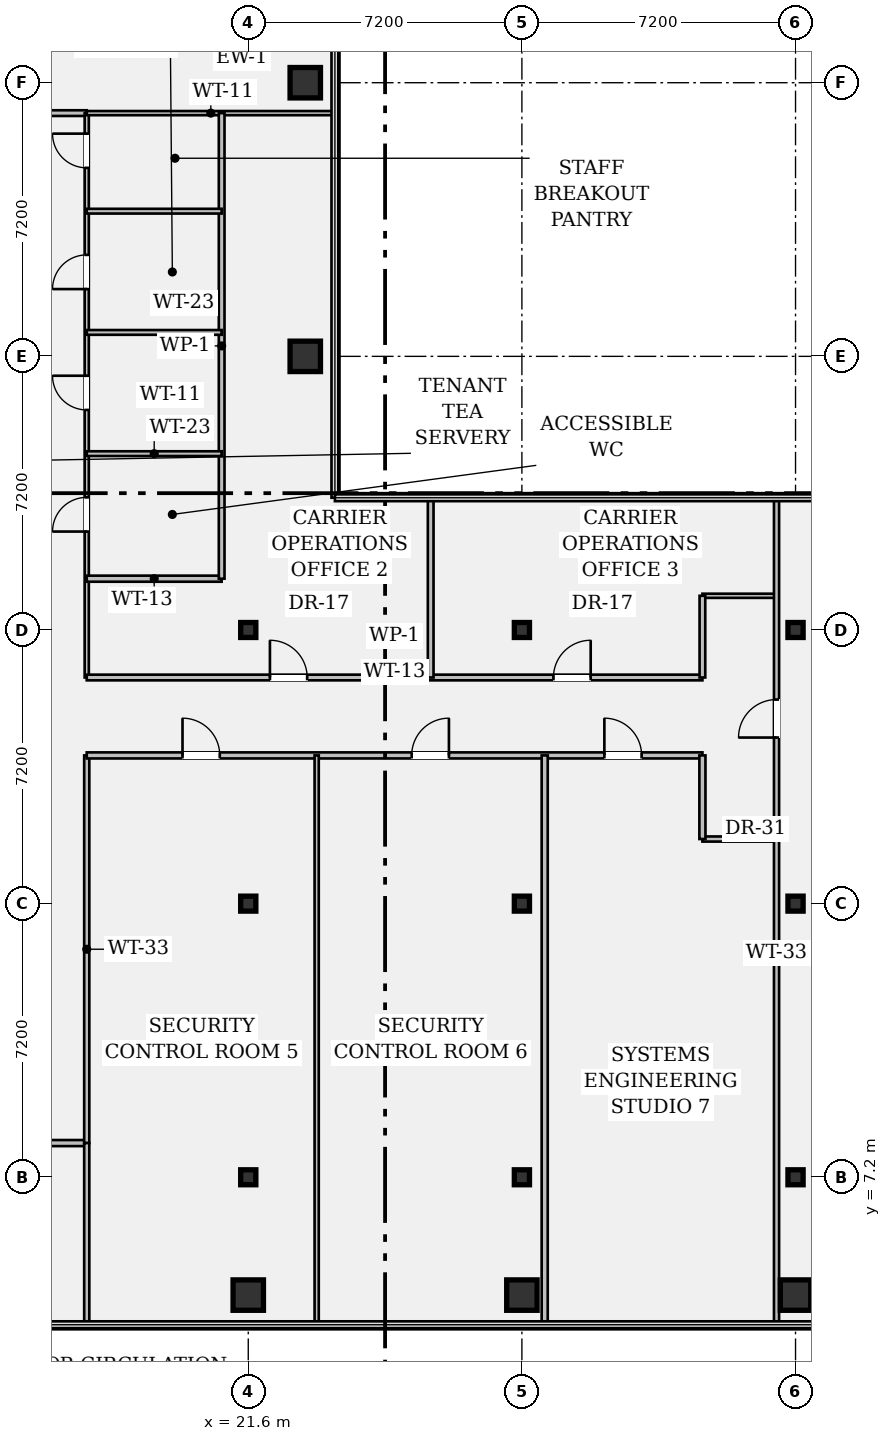
"""IFC4 building model, lengths in metres.
Left out: names, types, materials, properties, quantities, classifications, styles, units other than length and angle.
Written with IfcOpenShell. Run it as: python <this file> out.ifc"""

import sys

from ifc_helpers import new_model, si_unit, direction, frame, frame_2d, origin, origin_2d, place, context, subcontext, project, spatial, rectangle, hollow_rectangle, i_section, extrude, element, fill, save


model = new_model("IFC4")
c1 = context("Model", 3, precision=1e-05, world=origin(), true_north=direction((0.0, 1.0)))
c2 = subcontext(c1, "Body", "Model", "MODEL_VIEW")
j1 = project(units=[si_unit("LENGTHUNIT", "METRE"), si_unit("PLANEANGLEUNIT", "RADIAN")], contexts=[c1])
p1 = place(None, origin())
s1 = spatial("IfcSite", under=j1, at=p1, CompositionType="ELEMENT")
p2 = place(p1, origin())
s2 = spatial("IfcBuilding", under=s1, at=p2, CompositionType="ELEMENT")
p3 = place(p2, frame((0.0, 0.0, 190.75)))
s3 = spatial("IfcBuildingStorey", under=s2, at=p3, CompositionType="ELEMENT", Elevation=190.75)
p4 = place(p3, frame((21.6, 4.1, 0.0), z_axis=(0.0, 0.0, 1.0), x_axis=(1.0, 0.0, 0.0)))
e1 = element("IfcColumn", 1, at=p4, inside=s3, PredefinedType="COLUMN", context=c2, shape_type="SweptSolid", body=[
    extrude(hollow_rectangle(XDim=0.8, YDim=0.8, WallThickness=0.05, at=origin_2d()), origin(), (0.0, 0.0, 1.0), 3.24),
])
for number, where, z_axis, x_axis in (
    (2, (21.6, 7.2, 0.0), (0.0, 0.0, 1.0), (1.0, 0.0, 0.0)),
    (3, (21.6, 14.4, 0.0), (0.0, 0.0, 1.0), (1.0, 0.0, 0.0)),
    (4, (21.6, 21.6, 0.0), (0.0, 0.0, 1.0), (1.0, 0.0, 0.0)),
):
    element("IfcColumn", number, at=place(p3, frame(where, z_axis=z_axis, x_axis=x_axis)), inside=s3, PredefinedType="COLUMN", context=c2, shape_type="SweptSolid", body=[
        extrude(i_section(OverallWidth=0.399, OverallDepth=0.394, WebThickness=0.023, FlangeThickness=0.037, FilletRadius=0.018, at=origin_2d()), origin(), (0.0, 0.0, 1.0), 3.24),
    ])
for number, where, z_axis, x_axis in (
    (5, (23.1, 28.8, 0.0), (0.0, 0.0, 1.0), (1.0, 0.0, 0.0)),
    (6, (23.1, 36.0, 0.0), (0.0, 0.0, 1.0), (1.0, 0.0, 0.0)),
    (7, (28.8, 4.1, 0.0), (0.0, 0.0, 1.0), (1.0, 0.0, 0.0)),
):
    element("IfcColumn", number, at=place(p3, frame(where, z_axis=z_axis, x_axis=x_axis)), inside=s3, PredefinedType="COLUMN", context=c2, shape_type="SweptSolid", body=[
        extrude(hollow_rectangle(XDim=0.8, YDim=0.8, WallThickness=0.05, at=origin_2d()), origin(), (0.0, 0.0, 1.0), 3.24),
    ])
for number, where, z_axis, x_axis in (
    (8, (28.8, 7.2, 0.0), (0.0, 0.0, 1.0), (1.0, 0.0, 0.0)),
    (9, (28.8, 14.4, 0.0), (0.0, 0.0, 1.0), (1.0, 0.0, 0.0)),
    (10, (28.8, 21.6, 0.0), (0.0, 0.0, 1.0), (1.0, 0.0, 0.0)),
):
    element("IfcColumn", number, at=place(p3, frame(where, z_axis=z_axis, x_axis=x_axis)), inside=s3, PredefinedType="COLUMN", context=c2, shape_type="SweptSolid", body=[
        extrude(i_section(OverallWidth=0.399, OverallDepth=0.394, WebThickness=0.023, FlangeThickness=0.037, FilletRadius=0.018, at=origin_2d()), origin(), (0.0, 0.0, 1.0), 3.24),
    ])
p5 = place(p3, frame((36.0, 4.1, 0.0), z_axis=(0.0, 0.0, 1.0), x_axis=(1.0, 0.0, 0.0)))
e11 = element("IfcColumn", 11, at=p5, inside=s3, PredefinedType="COLUMN", context=c2, shape_type="SweptSolid", body=[
    extrude(hollow_rectangle(XDim=0.8, YDim=0.8, WallThickness=0.05, at=origin_2d()), origin(), (0.0, 0.0, 1.0), 3.24),
])
for number, where, z_axis, x_axis in (
    (12, (36.0, 7.2, 0.0), (0.0, 0.0, 1.0), (1.0, 0.0, 0.0)),
    (13, (36.0, 14.4, 0.0), (0.0, 0.0, 1.0), (1.0, 0.0, 0.0)),
    (14, (36.0, 21.6, 0.0), (0.0, 0.0, 1.0), (1.0, 0.0, 0.0)),
):
    element("IfcColumn", number, at=place(p3, frame(where, z_axis=z_axis, x_axis=x_axis)), inside=s3, PredefinedType="COLUMN", context=c2, shape_type="SweptSolid", body=[
        extrude(i_section(OverallWidth=0.399, OverallDepth=0.394, WebThickness=0.023, FlangeThickness=0.037, FilletRadius=0.018, at=origin_2d()), origin(), (0.0, 0.0, 1.0), 3.24),
    ])
p6 = place(p3, frame((14.4, 8.1, 0.0), z_axis=(0.0, 0.0, 1.0), x_axis=(1.0, 0.0, 0.0)))
e15 = element("IfcWall", 15, at=p6, inside=s3, PredefinedType="PARTITIONING", context=c2, shape_type="SweptSolid", body=[
    extrude(rectangle(XDim=2.95, YDim=0.16, at=frame_2d((1.475, 0.0))), origin(), (0.0, 0.0, 1.0), 2.808),
])
p7 = place(p6, frame((0.95, 0.0, 0.0)))
e16 = element("IfcOpeningElement", 16, at=p7, cuts=e15, PredefinedType="OPENING", context=c2, shape_type="SweptSolid", body=[
    extrude(rectangle(XDim=0.98, YDim=2.15, at=frame_2d((0.49, 1.075))), frame((0.0, 0.092, 0.0), z_axis=(0.0, -1.0, 0.0), x_axis=(1.0, 0.0, 0.0)), (0.0, 0.0, 1.0), 0.184),
])
p8 = place(p3, frame((14.4, 35.2, 0.0), z_axis=(0.0, 0.0, 1.0), x_axis=(1.0, 0.0, 0.0)))
e17 = element("IfcWall", 17, at=p8, inside=s3, PredefinedType="PARTITIONING", context=c2, shape_type="SweptSolid", body=[
    extrude(rectangle(XDim=2.95, YDim=0.15, at=frame_2d((1.475, 0.0))), origin(), (0.0, 0.0, 1.0), 2.808),
])
p9 = place(p8, frame((0.95, 0.0, 0.0)))
e18 = element("IfcOpeningElement", 18, at=p9, cuts=e17, PredefinedType="OPENING", context=c2, shape_type="SweptSolid", body=[
    extrude(rectangle(XDim=1.0, YDim=2.15, at=frame_2d((0.5, 1.075))), frame((0.0, 0.087, 0.0), z_axis=(0.0, -1.0, 0.0), x_axis=(1.0, 0.0, 0.0)), (0.0, 0.0, 1.0), 0.174),
])
p10 = place(p3, frame((17.35, 8.1, 0.0), z_axis=(0.0, 0.0, 1.0), x_axis=(0.0, 1.0, 0.0)))
e19 = element("IfcWall", 19, at=p10, inside=s3, PredefinedType="PARTITIONING", context=c2, shape_type="SweptSolid", body=[
    extrude(rectangle(XDim=10.2, YDim=0.135, at=frame_2d((5.1, 0.0))), origin(), (0.0, 0.0, 1.0), 2.603),
])
p11 = place(p3, frame((17.35, 20.35, 0.0), z_axis=(0.0, 0.0, 1.0), x_axis=(0.0, 1.0, 0.0)))
e20 = element("IfcWall", 20, at=p11, inside=s3, PredefinedType="PARTITIONING", context=c2, shape_type="SweptSolid", body=[
    extrude(rectangle(XDim=14.85, YDim=0.11, at=frame_2d((7.425, 0.0))), origin(), (0.0, 0.0, 1.0), 2.603),
])
p12 = place(p11, frame((3.84, 0.0, 0.0)))
e21 = element("IfcOpeningElement", 21, at=p12, cuts=e20, PredefinedType="OPENING", context=c2, shape_type="SweptSolid", body=[
    extrude(rectangle(XDim=0.9, YDim=2.15, at=frame_2d((0.45, 1.075))), frame((0.0, 0.067, 0.0), z_axis=(0.0, -1.0, 0.0), x_axis=(1.0, 0.0, 0.0)), (0.0, 0.0, 1.0), 0.134),
])
p13 = place(p11, frame((7.04, 0.0, 0.0)))
e22 = element("IfcOpeningElement", 22, at=p13, cuts=e20, PredefinedType="OPENING", context=c2, shape_type="SweptSolid", body=[
    extrude(rectangle(XDim=0.9, YDim=2.15, at=frame_2d((0.45, 1.075))), frame((0.0, 0.067, 0.0), z_axis=(0.0, -1.0, 0.0), x_axis=(1.0, 0.0, 0.0)), (0.0, 0.0, 1.0), 0.134),
])
p14 = place(p11, frame((10.22, 0.0, 0.0)))
e23 = element("IfcOpeningElement", 23, at=p14, cuts=e20, PredefinedType="OPENING", context=c2, shape_type="SweptSolid", body=[
    extrude(rectangle(XDim=0.9, YDim=2.15, at=frame_2d((0.45, 1.075))), frame((0.0, 0.067, 0.0), z_axis=(0.0, -1.0, 0.0), x_axis=(1.0, 0.0, 0.0)), (0.0, 0.0, 1.0), 0.134),
])
p15 = place(p11, frame((13.41, 0.0, 0.0)))
e24 = element("IfcOpeningElement", 24, at=p15, cuts=e20, PredefinedType="OPENING", context=c2, shape_type="SweptSolid", body=[
    extrude(rectangle(XDim=0.9, YDim=2.15, at=frame_2d((0.45, 1.075))), frame((0.0, 0.067, 0.0), z_axis=(0.0, -1.0, 0.0), x_axis=(1.0, 0.0, 0.0)), (0.0, 0.0, 1.0), 0.134),
])
p16 = place(p3, frame((17.35, 18.3, 0.0), z_axis=(0.0, 0.0, 1.0), x_axis=(1.0, 0.0, 0.0)))
e25 = element("IfcWall", 25, at=p16, inside=s3, PredefinedType="PARTITIONING", context=c2, shape_type="SweptSolid", body=[
    extrude(rectangle(XDim=16.2, YDim=0.16, at=frame_2d((8.1, 0.0))), origin(), (0.0, 0.0, 1.0), 2.603),
])
p17 = place(p16, frame((2.52, 0.0, 0.0)))
e26 = element("IfcOpeningElement", 26, at=p17, cuts=e25, PredefinedType="OPENING", context=c2, shape_type="SweptSolid", body=[
    extrude(rectangle(XDim=0.98, YDim=2.15, at=frame_2d((0.49, 1.075))), frame((0.0, 0.092, 0.0), z_axis=(0.0, -1.0, 0.0), x_axis=(1.0, 0.0, 0.0)), (0.0, 0.0, 1.0), 0.184),
])
p18 = place(p16, frame((8.55, 0.0, 0.0)))
e27 = element("IfcOpeningElement", 27, at=p18, cuts=e25, PredefinedType="OPENING", context=c2, shape_type="SweptSolid", body=[
    extrude(rectangle(XDim=0.98, YDim=2.15, at=frame_2d((0.49, 1.075))), frame((0.0, 0.092, 0.0), z_axis=(0.0, -1.0, 0.0), x_axis=(1.0, 0.0, 0.0)), (0.0, 0.0, 1.0), 0.184),
])
p19 = place(p16, frame((13.62, 0.0, 0.0)))
e28 = element("IfcOpeningElement", 28, at=p19, cuts=e25, PredefinedType="OPENING", context=c2, shape_type="SweptSolid", body=[
    extrude(rectangle(XDim=0.98, YDim=2.15, at=frame_2d((0.49, 1.075))), frame((0.0, 0.092, 0.0), z_axis=(0.0, -1.0, 0.0), x_axis=(1.0, 0.0, 0.0)), (0.0, 0.0, 1.0), 0.184),
])
p20 = place(p3, frame((17.35, 20.35, 0.0), z_axis=(0.0, 0.0, 1.0), x_axis=(1.0, 0.0, 0.0)))
e29 = element("IfcWall", 29, at=p20, inside=s3, PredefinedType="PARTITIONING", context=c2, shape_type="SweptSolid", body=[
    extrude(rectangle(XDim=16.2, YDim=0.15, at=frame_2d((8.1, 0.0))), origin(), (0.0, 0.0, 1.0), 2.603),
])
p21 = place(p20, frame((4.82, 0.0, 0.0)))
e30 = element("IfcOpeningElement", 30, at=p21, cuts=e29, PredefinedType="OPENING", context=c2, shape_type="SweptSolid", body=[
    extrude(rectangle(XDim=0.98, YDim=2.15, at=frame_2d((0.49, 1.075))), frame((0.0, 0.087, 0.0), z_axis=(0.0, -1.0, 0.0), x_axis=(1.0, 0.0, 0.0)), (0.0, 0.0, 1.0), 0.174),
])
p22 = place(p20, frame((12.28, 0.0, 0.0)))
e31 = element("IfcOpeningElement", 31, at=p22, cuts=e29, PredefinedType="OPENING", context=c2, shape_type="SweptSolid", body=[
    extrude(rectangle(XDim=0.98, YDim=2.15, at=frame_2d((0.49, 1.075))), frame((0.0, 0.087, 0.0), z_axis=(0.0, -1.0, 0.0), x_axis=(1.0, 0.0, 0.0)), (0.0, 0.0, 1.0), 0.174),
])
p23 = place(p3, frame((33.55, 16.1, 0.0), z_axis=(0.0, 0.0, 1.0), x_axis=(1.0, 0.0, 0.0)))
e32 = element("IfcWall", 32, at=p23, inside=s3, PredefinedType="PARTITIONING", context=c2, shape_type="SweptSolid", body=[
    extrude(rectangle(XDim=1.95, YDim=0.135, at=frame_2d((0.975, 0.0))), origin(), (0.0, 0.0, 1.0), 2.808),
])
p24 = place(p3, frame((33.55, 22.5, 0.0), z_axis=(0.0, 0.0, 1.0), x_axis=(1.0, 0.0, 0.0)))
e33 = element("IfcWall", 33, at=p24, inside=s3, PredefinedType="PARTITIONING", context=c2, shape_type="SweptSolid", body=[
    extrude(rectangle(XDim=1.95, YDim=0.11, at=frame_2d((0.975, 0.0))), origin(), (0.0, 0.0, 1.0), 3.24),
])
p25 = place(p3, frame((33.55, 16.1, 0.0), z_axis=(0.0, 0.0, 1.0), x_axis=(0.0, 1.0, 0.0)))
e34 = element("IfcWall", 34, at=p25, inside=s3, PredefinedType="PARTITIONING", context=c2, shape_type="SweptSolid", body=[
    extrude(rectangle(XDim=2.2, YDim=0.16, at=frame_2d((1.1, 0.0))), origin(), (0.0, 0.0, 1.0), 3.24),
])
p26 = place(p3, frame((33.55, 20.35, 0.0), z_axis=(0.0, 0.0, 1.0), x_axis=(0.0, 1.0, 0.0)))
e35 = element("IfcWall", 35, at=p26, inside=s3, PredefinedType="PARTITIONING", context=c2, shape_type="SweptSolid", body=[
    extrude(rectangle(XDim=2.15, YDim=0.15, at=frame_2d((1.075, 0.0))), origin(), (0.0, 0.0, 1.0), 2.603),
])
p27 = place(p3, frame((35.5, 3.32, 0.0), z_axis=(0.0, 0.0, 1.0), x_axis=(0.0, 1.0, 0.0)))
e36 = element("IfcWall", 36, at=p27, inside=s3, PredefinedType="PARTITIONING", context=c2, shape_type="SweptSolid", body=[
    extrude(rectangle(XDim=21.76, YDim=0.135, at=frame_2d((10.88, 0.0))), origin(), (0.0, 0.0, 1.0), 2.603),
])
p28 = place(p27, frame((15.45, 0.0, 0.0)))
e37 = element("IfcOpeningElement", 37, at=p28, cuts=e36, PredefinedType="OPENING", context=c2, shape_type="SweptSolid", body=[
    extrude(rectangle(XDim=1.0, YDim=2.15, at=frame_2d((0.5, 1.075))), frame((0.0, 0.08, 0.0), z_axis=(0.0, -1.0, 0.0), x_axis=(1.0, 0.0, 0.0)), (0.0, 0.0, 1.0), 0.159),
])
p29 = place(p3, frame((17.35, 35.2, 0.0), z_axis=(0.0, 0.0, 1.0), x_axis=(1.0, 0.0, 0.0)))
e38 = element("IfcWall", 38, at=p29, inside=s3, PredefinedType="PARTITIONING", context=c2, shape_type="SweptSolid", body=[
    extrude(rectangle(XDim=6.53, YDim=0.11, at=frame_2d((3.265, 0.0))), origin(), (0.0, 0.0, 1.0), 2.758),
])
p30 = place(p3, frame((17.35, 22.95, 0.0), z_axis=(0.0, 0.0, 1.0), x_axis=(1.0, 0.0, 0.0)))
e39 = element("IfcWall", 39, at=p30, inside=s3, PredefinedType="PARTITIONING", context=c2, shape_type="SweptSolid", body=[
    extrude(rectangle(XDim=3.55, YDim=0.16, at=frame_2d((1.775, 0.0))), origin(), (0.0, 0.0, 1.0), 2.808),
])
p31 = place(p3, frame((20.9, 22.95, 0.0), z_axis=(0.0, 0.0, 1.0), x_axis=(0.0, 1.0, 0.0)))
e40 = element("IfcWall", 40, at=p31, inside=s3, PredefinedType="PARTITIONING", context=c2, shape_type="SweptSolid", body=[
    extrude(rectangle(XDim=12.25, YDim=0.15, at=frame_2d((6.125, 0.0))), origin(), (0.0, 0.0, 1.0), 2.603),
])
for number, where, z_axis, x_axis in (
    (41, (17.35, 26.24, 0.0), (0.0, 0.0, 1.0), (1.0, 0.0, 0.0)),
    (42, (17.35, 29.43, 0.0), (0.0, 0.0, 1.0), (1.0, 0.0, 0.0)),
    (43, (17.35, 32.62, 0.0), (0.0, 0.0, 1.0), (1.0, 0.0, 0.0)),
):
    element("IfcWall", number, at=place(p3, frame(where, z_axis=z_axis, x_axis=x_axis)), inside=s3, PredefinedType="PARTITIONING", context=c2, shape_type="SweptSolid", body=[
        extrude(rectangle(XDim=3.55, YDim=0.125, at=frame_2d((1.775, 0.0))), origin(), (0.0, 0.0, 1.0), 2.808),
    ])
p32 = place(p3, frame((26.4, 20.35, 0.0), z_axis=(0.0, 0.0, 1.0), x_axis=(0.0, 1.0, 0.0)))
e44 = element("IfcWall", 44, at=p32, inside=s3, PredefinedType="PARTITIONING", context=c2, shape_type="SweptSolid", body=[
    extrude(rectangle(XDim=4.7, YDim=0.15, at=frame_2d((2.35, 0.0))), origin(), (0.0, 0.0, 1.0), 2.603),
])
p33 = place(p3, frame((17.35, 3.32, 0.0), z_axis=(0.0, 0.0, 1.0), x_axis=(0.0, 1.0, 0.0)))
e45 = element("IfcWall", 45, at=p33, inside=s3, PredefinedType="PARTITIONING", context=c2, shape_type="SweptSolid", body=[
    extrude(rectangle(XDim=4.78, YDim=0.135, at=frame_2d((2.39, 0.0))), origin(), (0.0, 0.0, 1.0), 2.603),
])
p34 = place(p3, frame((23.4, 3.32, 0.0), z_axis=(0.0, 0.0, 1.0), x_axis=(0.0, 1.0, 0.0)))
e46 = element("IfcWall", 46, at=p34, inside=s3, PredefinedType="PARTITIONING", context=c2, shape_type="SweptSolid", body=[
    extrude(rectangle(XDim=14.98, YDim=0.11, at=frame_2d((7.49, 0.0))), origin(), (0.0, 0.0, 1.0), 2.603),
])
p35 = place(p3, frame((29.4, 3.32, 0.0), z_axis=(0.0, 0.0, 1.0), x_axis=(0.0, 1.0, 0.0)))
e47 = element("IfcWall", 47, at=p35, inside=s3, PredefinedType="PARTITIONING", context=c2, shape_type="SweptSolid", body=[
    extrude(rectangle(XDim=14.98, YDim=0.16, at=frame_2d((7.49, 0.0))), origin(), (0.0, 0.0, 1.0), 2.603),
])
p36 = place(p12, origin())
e48 = element("IfcDoor", 48, at=p36, inside=s3, OperationType="SINGLE_SWING_LEFT", PredefinedType="DOOR", context=c2, shape_type="SweptSolid", body=[
    extrude(rectangle(XDim=0.9, YDim=2.15, at=frame_2d((0.45, 1.075))), frame((0.0, 0.025, 0.0), z_axis=(0.0, -1.0, 0.0), x_axis=(1.0, 0.0, 0.0)), (0.0, 0.0, 1.0), 0.05),
])
fill(e21, e48)
p37 = place(p13, origin())
e49 = element("IfcDoor", 49, at=p37, inside=s3, OperationType="SINGLE_SWING_RIGHT", PredefinedType="DOOR", context=c2, shape_type="SweptSolid", body=[
    extrude(rectangle(XDim=0.9, YDim=2.15, at=frame_2d((0.45, 1.075))), frame((0.0, 0.025, 0.0), z_axis=(0.0, -1.0, 0.0), x_axis=(1.0, 0.0, 0.0)), (0.0, 0.0, 1.0), 0.05),
])
fill(e22, e49)
p38 = place(p14, origin())
e50 = element("IfcDoor", 50, at=p38, inside=s3, OperationType="SINGLE_SWING_LEFT", PredefinedType="DOOR", context=c2, shape_type="SweptSolid", body=[
    extrude(rectangle(XDim=0.9, YDim=2.15, at=frame_2d((0.45, 1.075))), frame((0.0, 0.025, 0.0), z_axis=(0.0, -1.0, 0.0), x_axis=(1.0, 0.0, 0.0)), (0.0, 0.0, 1.0), 0.05),
])
fill(e23, e50)
p39 = place(p15, origin())
e51 = element("IfcDoor", 51, at=p39, inside=s3, OperationType="SINGLE_SWING_RIGHT", PredefinedType="DOOR", context=c2, shape_type="SweptSolid", body=[
    extrude(rectangle(XDim=0.9, YDim=2.15, at=frame_2d((0.45, 1.075))), frame((0.0, 0.025, 0.0), z_axis=(0.0, -1.0, 0.0), x_axis=(1.0, 0.0, 0.0)), (0.0, 0.0, 1.0), 0.05),
])
fill(e24, e51)
p40 = place(p21, origin())
e52 = element("IfcDoor", 52, at=p40, inside=s3, OperationType="SINGLE_SWING_LEFT", PredefinedType="DOOR", context=c2, shape_type="SweptSolid", body=[
    extrude(rectangle(XDim=0.98, YDim=2.15, at=frame_2d((0.49, 1.075))), frame((0.0, 0.025, 0.0), z_axis=(0.0, -1.0, 0.0), x_axis=(1.0, 0.0, 0.0)), (0.0, 0.0, 1.0), 0.05),
])
fill(e30, e52)
p41 = place(p22, origin())
e53 = element("IfcDoor", 53, at=p41, inside=s3, OperationType="SINGLE_SWING_RIGHT", PredefinedType="DOOR", context=c2, shape_type="SweptSolid", body=[
    extrude(rectangle(XDim=0.98, YDim=2.15, at=frame_2d((0.49, 1.075))), frame((0.0, 0.025, 0.0), z_axis=(0.0, -1.0, 0.0), x_axis=(1.0, 0.0, 0.0)), (0.0, 0.0, 1.0), 0.05),
])
fill(e31, e53)
p42 = place(p17, origin())
e54 = element("IfcDoor", 54, at=p42, inside=s3, OperationType="SINGLE_SWING_LEFT", PredefinedType="DOOR", context=c2, shape_type="SweptSolid", body=[
    extrude(rectangle(XDim=0.98, YDim=2.15, at=frame_2d((0.49, 1.075))), frame((0.0, 0.025, 0.0), z_axis=(0.0, -1.0, 0.0), x_axis=(1.0, 0.0, 0.0)), (0.0, 0.0, 1.0), 0.05),
])
fill(e26, e54)
p43 = place(p18, origin())
e55 = element("IfcDoor", 55, at=p43, inside=s3, OperationType="SINGLE_SWING_RIGHT", PredefinedType="DOOR", context=c2, shape_type="SweptSolid", body=[
    extrude(rectangle(XDim=0.98, YDim=2.15, at=frame_2d((0.49, 1.075))), frame((0.0, 0.025, 0.0), z_axis=(0.0, -1.0, 0.0), x_axis=(1.0, 0.0, 0.0)), (0.0, 0.0, 1.0), 0.05),
])
fill(e27, e55)
p44 = place(p19, origin())
e56 = element("IfcDoor", 56, at=p44, inside=s3, OperationType="SINGLE_SWING_LEFT", PredefinedType="DOOR", context=c2, shape_type="SweptSolid", body=[
    extrude(rectangle(XDim=0.98, YDim=2.15, at=frame_2d((0.49, 1.075))), frame((0.0, 0.025, 0.0), z_axis=(0.0, -1.0, 0.0), x_axis=(1.0, 0.0, 0.0)), (0.0, 0.0, 1.0), 0.05),
])
fill(e28, e56)
p45 = place(p28, origin())
e57 = element("IfcDoor", 57, at=p45, inside=s3, OperationType="SINGLE_SWING_LEFT", PredefinedType="DOOR", context=c2, shape_type="SweptSolid", body=[
    extrude(rectangle(XDim=1.0, YDim=2.15, at=frame_2d((0.5, 1.075))), frame((0.0, 0.025, 0.0), z_axis=(0.0, -1.0, 0.0), x_axis=(1.0, 0.0, 0.0)), (0.0, 0.0, 1.0), 0.05),
])
fill(e37, e57)
save(model, sys.argv[1])
